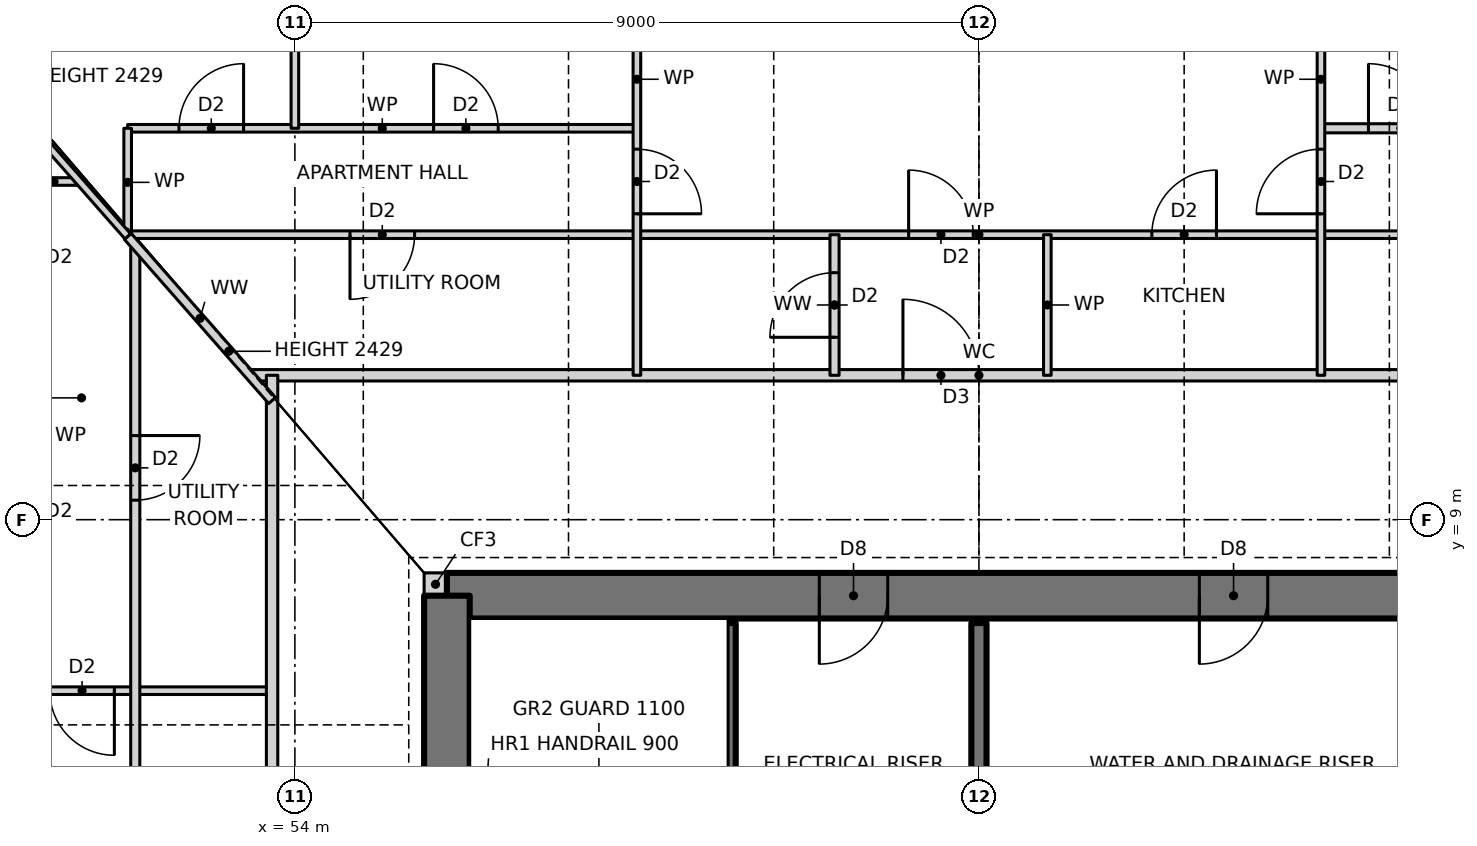
"""IFC4 building model, lengths in metres.
Left out: names, types, materials, properties, quantities, classifications, styles, units other than length and angle.
Written with IfcOpenShell. Run it as: python <this file> out.ifc"""

import sys

from ifc_helpers import new_model, si_unit, direction, frame, frame_2d, origin, place, context, subcontext, project, spatial, rectangle, extrude, element, fill, save


model = new_model("IFC4")
c1 = context("Model", 3, precision=1e-05, world=origin(), true_north=direction((0.0, 1.0)))
c2 = subcontext(c1, "Body", "Model", "MODEL_VIEW")
j1 = project(units=[si_unit("LENGTHUNIT", "METRE"), si_unit("PLANEANGLEUNIT", "RADIAN")], contexts=[c1])
p1 = place(None, origin())
s1 = spatial("IfcSite", under=j1, at=p1, CompositionType="ELEMENT")
p2 = place(p1, origin())
s2 = spatial("IfcBuilding", under=s1, at=p2, CompositionType="ELEMENT")
p3 = place(p2, frame((0.0, 0.0, 36.0)))
s3 = spatial("IfcBuildingStorey", under=s2, at=p3, CompositionType="ELEMENT", Elevation=36.0)
p4 = place(p3, frame((55.7, 8.15, 0.0), z_axis=(0.0, 0.0, 1.0), x_axis=(1.0, 0.0, 0.0)))
e1 = element("IfcWall", 1, at=p4, inside=s3, PredefinedType="SOLIDWALL", context=c2, shape_type="SweptSolid", body=[
    extrude(rectangle(XDim=0.3, YDim=0.3, at=frame_2d((0.15, 0.0))), origin(), (0.0, 0.0, 1.0), 3.5),
])
p5 = place(p3, frame((70.0, 8.0, 0.0), z_axis=(0.0, 0.0, 1.0), x_axis=(-1.0, 0.0, 0.0)))
e2 = element("IfcWall", 2, at=p5, inside=s3, PredefinedType="SHEAR", context=c2, shape_type="SweptSolid", body=[
    extrude(rectangle(XDim=14.0, YDim=0.6, at=frame_2d((7.0, 0.0))), origin(), (0.0, 0.0, 1.0), 3.5),
])
p6 = place(p5, frame((8.2, 0.0, 0.0)))
e3 = element("IfcOpeningElement", 3, at=p6, cuts=e2, PredefinedType="OPENING", context=c2, shape_type="SweptSolid", body=[
    extrude(rectangle(XDim=0.9, YDim=2.1, at=frame_2d((0.45, 1.05))), frame((0.0, 0.31, 0.0), z_axis=(0.0, -1.0, 0.0), x_axis=(1.0, 0.0, 0.0)), (0.0, 0.0, 1.0), 0.62),
])
p7 = place(p5, frame((3.2, 0.0, 0.0)))
e4 = element("IfcOpeningElement", 4, at=p7, cuts=e2, PredefinedType="OPENING", context=c2, shape_type="SweptSolid", body=[
    extrude(rectangle(XDim=0.9, YDim=2.1, at=frame_2d((0.45, 1.05))), frame((0.0, 0.31, 0.0), z_axis=(0.0, -1.0, 0.0), x_axis=(1.0, 0.0, 0.0)), (0.0, 0.0, 1.0), 0.62),
])
p8 = place(p3, frame((56.0, 8.0, 0.0), z_axis=(0.0, 0.0, 1.0), x_axis=(0.0, -1.0, 0.0)))
e5 = element("IfcWall", 5, at=p8, inside=s3, PredefinedType="SHEAR", context=c2, shape_type="SweptSolid", body=[
    extrude(rectangle(XDim=16.0, YDim=0.6, at=frame_2d((8.0, 0.0))), origin(), (0.0, 0.0, 1.0), 3.5),
])
p9 = place(p8, frame((7.5, 0.0, 0.0)))
e6 = element("IfcOpeningElement", 6, at=p9, cuts=e5, PredefinedType="OPENING", context=c2, shape_type="SweptSolid", body=[
    extrude(rectangle(XDim=1.0, YDim=2.1, at=frame_2d((0.5, 1.05))), frame((0.0, 0.31, 0.0), z_axis=(0.0, -1.0, 0.0), x_axis=(1.0, 0.0, 0.0)), (0.0, 0.0, 1.0), 0.62),
])
p10 = place(p3, frame((46.56, 6.75, 0.0), z_axis=(0.0, 0.0, 1.0), x_axis=(1.0, 0.0, 0.0)))
e7 = element("IfcWall", 7, at=p10, inside=s3, PredefinedType="PARTITIONING", context=c2, shape_type="SweptSolid", body=[
    extrude(rectangle(XDim=7.14, YDim=0.1, at=frame_2d((3.57, 0.0))), origin(), (0.0, 0.0, 1.0), 3.27),
])
p11 = place(p10, frame((4.215, 0.0, 0.0)))
e8 = element("IfcOpeningElement", 8, at=p11, cuts=e7, PredefinedType="OPENING", context=c2, shape_type="SweptSolid", body=[
    extrude(rectangle(XDim=0.85, YDim=2.1, at=frame_2d((0.425, 1.05))), frame((0.0, 0.06, 0.0), z_axis=(0.0, -1.0, 0.0), x_axis=(1.0, 0.0, 0.0)), (0.0, 0.0, 1.0), 0.12),
])
p12 = place(p3, frame((53.408, 10.9, 0.0), z_axis=(0.0, 0.0, 1.0), x_axis=(1.0, 0.0, 0.0)))
e9 = element("IfcWall", 9, at=p12, inside=s3, PredefinedType="PARTITIONING", context=c2, shape_type="SweptSolid", body=[
    extrude(rectangle(XDim=19.184, YDim=0.15, at=frame_2d((9.592, 0.0))), origin(), (0.0, 0.0, 1.0), 3.27),
])
p13 = place(p12, frame((8.592, 0.0, 0.0)))
e10 = element("IfcOpeningElement", 10, at=p13, cuts=e9, PredefinedType="OPENING", context=c2, shape_type="SweptSolid", body=[
    extrude(rectangle(XDim=1.0, YDim=2.1, at=frame_2d((0.5, 1.05))), frame((0.0, 0.085, 0.0), z_axis=(0.0, -1.0, 0.0), x_axis=(1.0, 0.0, 0.0)), (0.0, 0.0, 1.0), 0.17),
])
p14 = place(p3, frame((51.8, 12.75, 0.0), z_axis=(0.0, 0.0, 1.0), x_axis=(1.0, 0.0, 0.0)))
e11 = element("IfcWall", 11, at=p14, inside=s3, PredefinedType="PARTITIONING", context=c2, shape_type="SweptSolid", body=[
    extrude(rectangle(XDim=22.4, YDim=0.1, at=frame_2d((11.2, 0.0))), origin(), (0.0, 0.0, 1.0), 3.27),
])
p15 = place(p14, frame((13.475, 0.0, 0.0)))
e12 = element("IfcOpeningElement", 12, at=p15, cuts=e11, PredefinedType="OPENING", context=c2, shape_type="SweptSolid", body=[
    extrude(rectangle(XDim=0.85, YDim=2.1, at=frame_2d((0.425, 1.05))), frame((0.0, 0.06, 0.0), z_axis=(0.0, -1.0, 0.0), x_axis=(1.0, 0.0, 0.0)), (0.0, 0.0, 1.0), 0.12),
])
p16 = place(p14, frame((10.275, 0.0, 0.0)))
e13 = element("IfcOpeningElement", 13, at=p16, cuts=e11, PredefinedType="OPENING", context=c2, shape_type="SweptSolid", body=[
    extrude(rectangle(XDim=0.85, YDim=2.1, at=frame_2d((0.425, 1.05))), frame((0.0, 0.06, 0.0), z_axis=(0.0, -1.0, 0.0), x_axis=(1.0, 0.0, 0.0)), (0.0, 0.0, 1.0), 0.12),
])
p17 = place(p14, frame((18.625, 0.0, 0.0)))
e14 = element("IfcOpeningElement", 14, at=p17, cuts=e11, PredefinedType="OPENING", context=c2, shape_type="SweptSolid", body=[
    extrude(rectangle(XDim=0.85, YDim=2.1, at=frame_2d((0.425, 1.05))), frame((0.0, 0.06, 0.0), z_axis=(0.0, -1.0, 0.0), x_axis=(1.0, 0.0, 0.0)), (0.0, 0.0, 1.0), 0.12),
])
p18 = place(p14, frame((2.925, 0.0, 0.0)))
e15 = element("IfcOpeningElement", 15, at=p18, cuts=e11, PredefinedType="OPENING", context=c2, shape_type="SweptSolid", body=[
    extrude(rectangle(XDim=0.85, YDim=2.1, at=frame_2d((0.425, 1.05))), frame((0.0, 0.06, 0.0), z_axis=(0.0, -1.0, 0.0), x_axis=(1.0, 0.0, 0.0)), (0.0, 0.0, 1.0), 0.12),
])
p19 = place(p3, frame((50.5, 13.45, 0.0), z_axis=(0.0, 0.0, 1.0), x_axis=(1.0, 0.0, 0.0)))
e16 = element("IfcWall", 16, at=p19, inside=s3, PredefinedType="PARTITIONING", context=c2, shape_type="SweptSolid", body=[
    extrude(rectangle(XDim=0.664, YDim=0.1, at=frame_2d((0.332, 0.0))), origin(), (0.0, 0.0, 1.0), 3.27),
])
p20 = place(p3, frame((51.8, 14.15, 0.0), z_axis=(0.0, 0.0, 1.0), x_axis=(1.0, 0.0, 0.0)))
e17 = element("IfcWall", 17, at=p20, inside=s3, PredefinedType="PARTITIONING", context=c2, shape_type="SweptSolid", body=[
    extrude(rectangle(XDim=6.7, YDim=0.1, at=frame_2d((3.35, 0.0))), origin(), (0.0, 0.0, 1.0), 3.27),
])
p21 = place(p20, frame((4.025, 0.0, 0.0)))
e18 = element("IfcOpeningElement", 18, at=p21, cuts=e17, PredefinedType="OPENING", context=c2, shape_type="SweptSolid", body=[
    extrude(rectangle(XDim=0.85, YDim=2.1, at=frame_2d((0.425, 1.05))), frame((0.0, 0.06, 0.0), z_axis=(0.0, -1.0, 0.0), x_axis=(1.0, 0.0, 0.0)), (0.0, 0.0, 1.0), 0.12),
])
p22 = place(p20, frame((0.675, 0.0, 0.0)))
e19 = element("IfcOpeningElement", 19, at=p22, cuts=e17, PredefinedType="OPENING", context=c2, shape_type="SweptSolid", body=[
    extrude(rectangle(XDim=0.85, YDim=2.1, at=frame_2d((0.425, 1.05))), frame((0.0, 0.06, 0.0), z_axis=(0.0, -1.0, 0.0), x_axis=(1.0, 0.0, 0.0)), (0.0, 0.0, 1.0), 0.12),
])
p23 = place(p3, frame((67.5, 14.15, 0.0), z_axis=(0.0, 0.0, 1.0), x_axis=(1.0, 0.0, 0.0)))
e20 = element("IfcWall", 20, at=p23, inside=s3, PredefinedType="PARTITIONING", context=c2, shape_type="SweptSolid", body=[
    extrude(rectangle(XDim=6.7, YDim=0.12, at=frame_2d((3.35, 0.0))), origin(), (0.0, 0.0, 1.0), 3.27),
])
p24 = place(p23, frame((0.625, 0.0, 0.0)))
e21 = element("IfcOpeningElement", 21, at=p24, cuts=e20, PredefinedType="OPENING", context=c2, shape_type="SweptSolid", body=[
    extrude(rectangle(XDim=0.85, YDim=2.1, at=frame_2d((0.425, 1.05))), frame((0.0, 0.07, 0.0), z_axis=(0.0, -1.0, 0.0), x_axis=(1.0, 0.0, 0.0)), (0.0, 0.0, 1.0), 0.14),
])
p25 = place(p23, frame((5.175, 0.0, 0.0)))
e22 = element("IfcOpeningElement", 22, at=p25, cuts=e20, PredefinedType="OPENING", context=c2, shape_type="SweptSolid", body=[
    extrude(rectangle(XDim=0.85, YDim=2.1, at=frame_2d((0.425, 1.05))), frame((0.0, 0.07, 0.0), z_axis=(0.0, -1.0, 0.0), x_axis=(1.0, 0.0, 0.0)), (0.0, 0.0, 1.0), 0.14),
])
p26 = place(p3, frame((67.5, 10.9, 0.0), z_axis=(0.0, 0.0, 1.0), x_axis=(0.0, 1.0, 0.0)))
e23 = element("IfcWall", 23, at=p26, inside=s3, PredefinedType="PARTITIONING", context=c2, shape_type="SweptSolid", body=[
    extrude(rectangle(XDim=7.79, YDim=0.1, at=frame_2d((3.895, 0.0))), origin(), (0.0, 0.0, 1.0), 3.27),
])
p27 = place(p26, frame((2.125, 0.0, 0.0)))
e24 = element("IfcOpeningElement", 24, at=p27, cuts=e23, PredefinedType="OPENING", context=c2, shape_type="SweptSolid", body=[
    extrude(rectangle(XDim=0.85, YDim=2.1, at=frame_2d((0.425, 1.05))), frame((0.0, 0.06, 0.0), z_axis=(0.0, -1.0, 0.0), x_axis=(1.0, 0.0, 0.0)), (0.0, 0.0, 1.0), 0.12),
])
p28 = place(p3, frame((63.9, 10.9, 0.0), z_axis=(0.0, 0.0, 1.0), x_axis=(0.0, 1.0, 0.0)))
e25 = element("IfcWall", 25, at=p28, inside=s3, PredefinedType="PARTITIONING", context=c2, shape_type="SweptSolid", body=[
    extrude(rectangle(XDim=1.85, YDim=0.1, at=frame_2d((0.925, 0.0))), origin(), (0.0, 0.0, 1.0), 3.27),
])
p29 = place(p3, frame((63.0, 3.85, 0.0), z_axis=(0.0, 0.0, 1.0), x_axis=(0.0, 1.0, 0.0)))
e26 = element("IfcWall", 26, at=p29, inside=s3, PredefinedType="SOLIDWALL", context=c2, shape_type="SweptSolid", body=[
    extrude(rectangle(XDim=3.79, YDim=0.2, at=frame_2d((1.895, 0.0))), origin(), (0.0, 0.0, 1.0), 3.5),
])
p30 = place(p3, frame((61.1, 10.9, 0.0), z_axis=(0.0, 0.0, 1.0), x_axis=(0.0, 1.0, 0.0)))
e27 = element("IfcWall", 27, at=p30, inside=s3, PredefinedType="PARTITIONING", context=c2, shape_type="SweptSolid", body=[
    extrude(rectangle(XDim=1.85, YDim=0.12, at=frame_2d((0.925, 0.0))), origin(), (0.0, 0.0, 1.0), 3.27),
])
p31 = place(p30, frame((0.5, 0.0, 0.0)))
e28 = element("IfcOpeningElement", 28, at=p31, cuts=e27, PredefinedType="OPENING", context=c2, shape_type="SweptSolid", body=[
    extrude(rectangle(XDim=0.85, YDim=2.1, at=frame_2d((0.425, 1.05))), frame((0.0, 0.07, 0.0), z_axis=(0.0, -1.0, 0.0), x_axis=(1.0, 0.0, 0.0)), (0.0, 0.0, 1.0), 0.14),
])
p32 = place(p3, frame((59.7, 1.05, 0.0), z_axis=(0.0, 0.0, 1.0), x_axis=(0.0, 1.0, 0.0)))
e29 = element("IfcWall", 29, at=p32, inside=s3, PredefinedType="SOLIDWALL", context=c2, shape_type="SweptSolid", body=[
    extrude(rectangle(XDim=6.59, YDim=0.2, at=frame_2d((3.295, 0.0))), origin(), (0.0, 0.0, 1.0), 3.5),
])
p33 = place(p3, frame((58.5, 10.9, 0.0), z_axis=(0.0, 0.0, 1.0), x_axis=(0.0, 1.0, 0.0)))
e30 = element("IfcWall", 30, at=p33, inside=s3, PredefinedType="PARTITIONING", context=c2, shape_type="SweptSolid", body=[
    extrude(rectangle(XDim=7.79, YDim=0.1, at=frame_2d((3.895, 0.0))), origin(), (0.0, 0.0, 1.0), 3.27),
])
p34 = place(p33, frame((2.125, 0.0, 0.0)))
e31 = element("IfcOpeningElement", 31, at=p34, cuts=e30, PredefinedType="OPENING", context=c2, shape_type="SweptSolid", body=[
    extrude(rectangle(XDim=0.85, YDim=2.1, at=frame_2d((0.425, 1.05))), frame((0.0, 0.06, 0.0), z_axis=(0.0, -1.0, 0.0), x_axis=(1.0, 0.0, 0.0)), (0.0, 0.0, 1.0), 0.12),
])
p35 = place(p3, frame((54.0, 14.15, 0.0), z_axis=(0.0, 0.0, 1.0), x_axis=(0.0, 1.0, 0.0)))
e32 = element("IfcWall", 32, at=p35, inside=s3, PredefinedType="PARTITIONING", context=c2, shape_type="SweptSolid", body=[
    extrude(rectangle(XDim=4.54, YDim=0.1, at=frame_2d((2.27, 0.0))), origin(), (0.0, 0.0, 1.0), 3.27),
])
p36 = place(p3, frame((53.7, -10.568, 0.0), z_axis=(0.0, 0.0, 1.0), x_axis=(0.0, 1.0, 0.0)))
e33 = element("IfcWall", 33, at=p36, inside=s3, PredefinedType="PARTITIONING", context=c2, shape_type="SweptSolid", body=[
    extrude(rectangle(XDim=21.468, YDim=0.15, at=frame_2d((10.734, 0.0))), origin(), (0.0, 0.0, 1.0), 3.27),
])
p37 = place(p36, frame((11.818, 0.0, 0.0)))
e34 = element("IfcOpeningElement", 34, at=p37, cuts=e33, PredefinedType="OPENING", context=c2, shape_type="SweptSolid", body=[
    extrude(rectangle(XDim=1.0, YDim=2.1, at=frame_2d((0.5, 1.05))), frame((0.0, 0.085, 0.0), z_axis=(0.0, -1.0, 0.0), x_axis=(1.0, 0.0, 0.0)), (0.0, 0.0, 1.0), 0.17),
])
p38 = place(p3, frame((51.9, -12.614, 0.0), z_axis=(0.0, 0.0, 1.0), x_axis=(0.0, 1.0, 0.0)))
e35 = element("IfcWall", 35, at=p38, inside=s3, PredefinedType="PARTITIONING", context=c2, shape_type="SweptSolid", body=[
    extrude(rectangle(XDim=25.228, YDim=0.12, at=frame_2d((12.614, 0.0))), origin(), (0.0, 0.0, 1.0), 3.27),
])
p39 = place(p38, frame((17.139, 0.0, 0.0)))
e36 = element("IfcOpeningElement", 36, at=p39, cuts=e35, PredefinedType="OPENING", context=c2, shape_type="SweptSolid", body=[
    extrude(rectangle(XDim=0.85, YDim=2.1, at=frame_2d((0.425, 1.05))), frame((0.0, 0.07, 0.0), z_axis=(0.0, -1.0, 0.0), x_axis=(1.0, 0.0, 0.0)), (0.0, 0.0, 1.0), 0.14),
])
p40 = place(p38, frame((13.939, 0.0, 0.0)))
e37 = element("IfcOpeningElement", 37, at=p40, cuts=e35, PredefinedType="OPENING", context=c2, shape_type="SweptSolid", body=[
    extrude(rectangle(XDim=0.85, YDim=2.1, at=frame_2d((0.425, 1.05))), frame((0.0, 0.07, 0.0), z_axis=(0.0, -1.0, 0.0), x_axis=(1.0, 0.0, 0.0)), (0.0, 0.0, 1.0), 0.14),
])
p41 = place(p38, frame((21.871, 0.0, 0.0)))
e38 = element("IfcOpeningElement", 38, at=p41, cuts=e35, PredefinedType="OPENING", context=c2, shape_type="SweptSolid", body=[
    extrude(rectangle(XDim=0.85, YDim=2.1, at=frame_2d((0.425, 1.05))), frame((0.0, 0.07, 0.0), z_axis=(0.0, -1.0, 0.0), x_axis=(1.0, 0.0, 0.0)), (0.0, 0.0, 1.0), 0.14),
])
p42 = place(p38, frame((7.739, 0.0, 0.0)))
e39 = element("IfcOpeningElement", 39, at=p42, cuts=e35, PredefinedType="OPENING", context=c2, shape_type="SweptSolid", body=[
    extrude(rectangle(XDim=0.85, YDim=2.1, at=frame_2d((0.425, 1.05))), frame((0.0, 0.07, 0.0), z_axis=(0.0, -1.0, 0.0), x_axis=(1.0, 0.0, 0.0)), (0.0, 0.0, 1.0), 0.14),
])
p43 = place(p38, frame((2.557, 0.0, 0.0)))
e40 = element("IfcOpeningElement", 40, at=p43, cuts=e35, PredefinedType="OPENING", context=c2, shape_type="SweptSolid", body=[
    extrude(rectangle(XDim=0.85, YDim=2.1, at=frame_2d((0.425, 1.05))), frame((0.0, 0.07, 0.0), z_axis=(0.0, -1.0, 0.0), x_axis=(1.0, 0.0, 0.0)), (0.0, 0.0, 1.0), 0.14),
])
p44 = place(p3, frame((51.8, 12.727, 0.0), z_axis=(0.0, 0.0, 1.0), x_axis=(0.0, 1.0, 0.0)))
e41 = element("IfcWall", 41, at=p44, inside=s3, PredefinedType="PARTITIONING", context=c2, shape_type="SweptSolid", body=[
    extrude(rectangle(XDim=1.423, YDim=0.1, at=frame_2d((0.711, 0.0))), origin(), (0.0, 0.0, 1.0), 3.27),
])
p45 = place(p3, frame((53.7, 10.568, 0.0), z_axis=(0.0, 0.0, 1.0), x_axis=(-0.660275707921, 0.751023294931, 0.0)))
e42 = element("IfcWall", 42, at=p45, inside=s3, PredefinedType="PARTITIONING", context=c2, shape_type="SweptSolid", body=[
    extrude(rectangle(XDim=2.876, YDim=0.12, at=frame_2d((1.438, 0.0))), origin(), (0.0, 0.0, 1.0), 2.429),
])
p46 = place(p3, frame((51.801, 12.728, 0.0), z_axis=(0.0, 0.0, 1.0), x_axis=(-0.660267638736, 0.751030389024, 0.0)))
e43 = element("IfcWall", 43, at=p46, inside=s3, PredefinedType="PARTITIONING", context=c2, shape_type="SweptSolid", body=[
    extrude(rectangle(XDim=5.837, YDim=0.1, at=frame_2d((2.918, 0.0))), origin(), (0.0, 0.0, 1.0), 2.429),
])
p47 = place(p15, origin())
e44 = element("IfcDoor", 44, at=p47, inside=s3, OperationType="SINGLE_SWING_RIGHT", PredefinedType="DOOR", context=c2, shape_type="SweptSolid", body=[
    extrude(rectangle(XDim=0.85, YDim=2.1, at=frame_2d((0.425, 1.05))), frame((0.0, 0.025, 0.0), z_axis=(0.0, -1.0, 0.0), x_axis=(1.0, 0.0, 0.0)), (0.0, 0.0, 1.0), 0.05),
])
fill(e12, e44)
p48 = place(p13, origin())
e45 = element("IfcDoor", 45, at=p48, inside=s3, OperationType="SINGLE_SWING_LEFT", PredefinedType="DOOR", context=c2, shape_type="SweptSolid", body=[
    extrude(rectangle(XDim=1.0, YDim=2.1, at=frame_2d((0.5, 1.05))), frame((0.0, 0.025, 0.0), z_axis=(0.0, -1.0, 0.0), x_axis=(1.0, 0.0, 0.0)), (0.0, 0.0, 1.0), 0.05),
])
fill(e10, e45)
p49 = place(p16, origin())
e46 = element("IfcDoor", 46, at=p49, inside=s3, OperationType="SINGLE_SWING_LEFT", PredefinedType="DOOR", context=c2, shape_type="SweptSolid", body=[
    extrude(rectangle(XDim=0.85, YDim=2.1, at=frame_2d((0.425, 1.05))), frame((0.0, 0.025, 0.0), z_axis=(0.0, -1.0, 0.0), x_axis=(1.0, 0.0, 0.0)), (0.0, 0.0, 1.0), 0.05),
])
fill(e13, e46)
p50 = place(p31, origin())
e47 = element("IfcDoor", 47, at=p50, inside=s3, OperationType="SINGLE_SWING_LEFT", PredefinedType="DOOR", context=c2, shape_type="SweptSolid", body=[
    extrude(rectangle(XDim=0.85, YDim=2.1, at=frame_2d((0.425, 1.05))), frame((0.0, 0.025, 0.0), z_axis=(0.0, -1.0, 0.0), x_axis=(1.0, 0.0, 0.0)), (0.0, 0.0, 1.0), 0.05),
])
fill(e28, e47)
p51 = place(p27, origin())
e48 = element("IfcDoor", 48, at=p51, inside=s3, OperationType="SINGLE_SWING_LEFT", PredefinedType="DOOR", context=c2, shape_type="SweptSolid", body=[
    extrude(rectangle(XDim=0.85, YDim=2.1, at=frame_2d((0.425, 1.05))), frame((0.0, 0.025, 0.0), z_axis=(0.0, -1.0, 0.0), x_axis=(1.0, 0.0, 0.0)), (0.0, 0.0, 1.0), 0.05),
])
fill(e24, e48)
p52 = place(p24, origin())
e49 = element("IfcDoor", 49, at=p52, inside=s3, OperationType="SINGLE_SWING_LEFT", PredefinedType="DOOR", context=c2, shape_type="SweptSolid", body=[
    extrude(rectangle(XDim=0.85, YDim=2.1, at=frame_2d((0.425, 1.05))), frame((0.0, 0.025, 0.0), z_axis=(0.0, -1.0, 0.0), x_axis=(1.0, 0.0, 0.0)), (0.0, 0.0, 1.0), 0.05),
])
fill(e21, e49)
p53 = place(p34, frame((0.85, 0.0, 0.0), z_axis=(0.0, 0.0, 1.0), x_axis=(-1.0, 0.0, 0.0)))
e50 = element("IfcDoor", 50, at=p53, inside=s3, OperationType="SINGLE_SWING_RIGHT", PredefinedType="DOOR", context=c2, shape_type="SweptSolid", body=[
    extrude(rectangle(XDim=0.85, YDim=2.1, at=frame_2d((0.425, 1.05))), frame((0.0, 0.025, 0.0), z_axis=(0.0, -1.0, 0.0), x_axis=(1.0, 0.0, 0.0)), (0.0, 0.0, 1.0), 0.05),
])
fill(e31, e50)
p54 = place(p21, origin())
e51 = element("IfcDoor", 51, at=p54, inside=s3, OperationType="SINGLE_SWING_LEFT", PredefinedType="DOOR", context=c2, shape_type="SweptSolid", body=[
    extrude(rectangle(XDim=0.85, YDim=2.1, at=frame_2d((0.425, 1.05))), frame((0.0, 0.025, 0.0), z_axis=(0.0, -1.0, 0.0), x_axis=(1.0, 0.0, 0.0)), (0.0, 0.0, 1.0), 0.05),
])
fill(e18, e51)
p55 = place(p22, origin())
e52 = element("IfcDoor", 52, at=p55, inside=s3, OperationType="SINGLE_SWING_RIGHT", PredefinedType="DOOR", context=c2, shape_type="SweptSolid", body=[
    extrude(rectangle(XDim=0.85, YDim=2.1, at=frame_2d((0.425, 1.05))), frame((0.0, 0.025, 0.0), z_axis=(0.0, -1.0, 0.0), x_axis=(1.0, 0.0, 0.0)), (0.0, 0.0, 1.0), 0.05),
])
fill(e19, e52)
p56 = place(p18, frame((0.85, 0.0, 0.0), z_axis=(0.0, 0.0, 1.0), x_axis=(-1.0, 0.0, 0.0)))
e53 = element("IfcDoor", 53, at=p56, inside=s3, OperationType="SINGLE_SWING_RIGHT", PredefinedType="DOOR", context=c2, shape_type="SweptSolid", body=[
    extrude(rectangle(XDim=0.85, YDim=2.1, at=frame_2d((0.425, 1.05))), frame((0.0, 0.025, 0.0), z_axis=(0.0, -1.0, 0.0), x_axis=(1.0, 0.0, 0.0)), (0.0, 0.0, 1.0), 0.05),
])
fill(e15, e53)
p57 = place(p11, frame((0.85, 0.0, 0.0), z_axis=(0.0, 0.0, 1.0), x_axis=(-1.0, 0.0, 0.0)))
e54 = element("IfcDoor", 54, at=p57, inside=s3, OperationType="SINGLE_SWING_LEFT", PredefinedType="DOOR", context=c2, shape_type="SweptSolid", body=[
    extrude(rectangle(XDim=0.85, YDim=2.1, at=frame_2d((0.425, 1.05))), frame((0.0, 0.025, 0.0), z_axis=(0.0, -1.0, 0.0), x_axis=(1.0, 0.0, 0.0)), (0.0, 0.0, 1.0), 0.05),
])
fill(e8, e54)
p58 = place(p41, frame((0.85, 0.0, 0.0), z_axis=(0.0, 0.0, 1.0), x_axis=(-1.0, 0.0, 0.0)))
e55 = element("IfcDoor", 55, at=p58, inside=s3, OperationType="SINGLE_SWING_LEFT", PredefinedType="DOOR", context=c2, shape_type="SweptSolid", body=[
    extrude(rectangle(XDim=0.85, YDim=2.1, at=frame_2d((0.425, 1.05))), frame((0.0, 0.025, 0.0), z_axis=(0.0, -1.0, 0.0), x_axis=(1.0, 0.0, 0.0)), (0.0, 0.0, 1.0), 0.05),
])
fill(e38, e55)
p59 = place(p6, origin())
e56 = element("IfcDoor", 56, at=p59, inside=s3, OperationType="SINGLE_SWING_RIGHT", PredefinedType="DOOR", context=c2, shape_type="SweptSolid", body=[
    extrude(rectangle(XDim=0.9, YDim=2.1, at=frame_2d((0.45, 1.05))), frame((0.0, 0.025, 0.0), z_axis=(0.0, -1.0, 0.0), x_axis=(1.0, 0.0, 0.0)), (0.0, 0.0, 1.0), 0.05),
])
fill(e3, e56)
p60 = place(p7, origin())
e57 = element("IfcDoor", 57, at=p60, inside=s3, OperationType="SINGLE_SWING_RIGHT", PredefinedType="DOOR", context=c2, shape_type="SweptSolid", body=[
    extrude(rectangle(XDim=0.9, YDim=2.1, at=frame_2d((0.45, 1.05))), frame((0.0, 0.025, 0.0), z_axis=(0.0, -1.0, 0.0), x_axis=(1.0, 0.0, 0.0)), (0.0, 0.0, 1.0), 0.05),
])
fill(e4, e57)
save(model, sys.argv[1])
